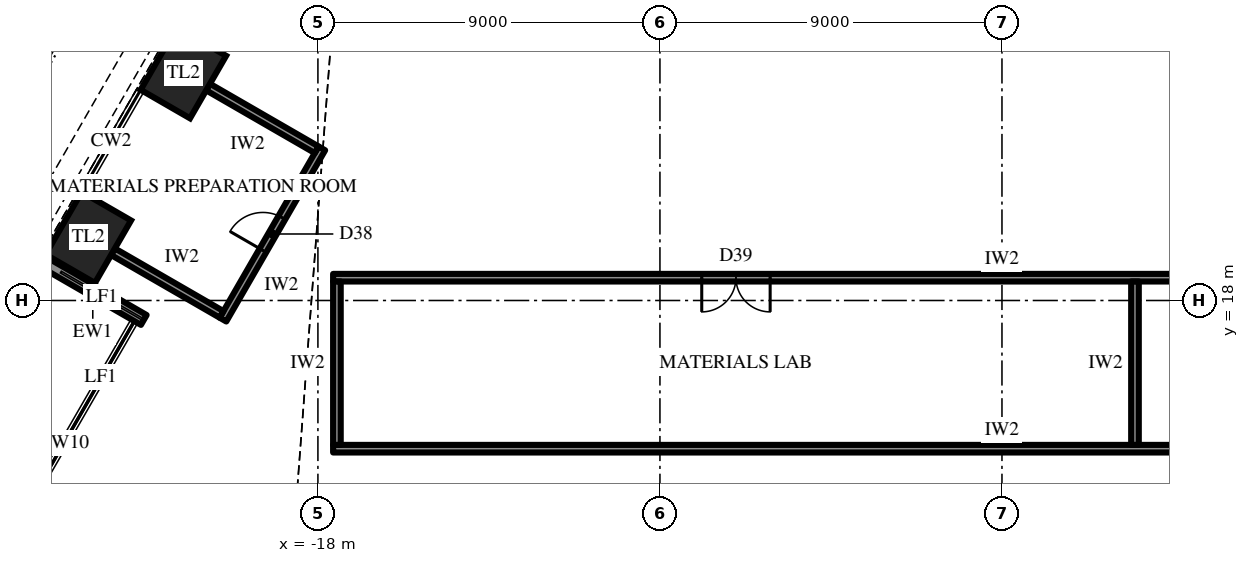
"""IFC4 building model, lengths in metres.
Left out: names, types, materials, properties, quantities, classifications, styles, units other than length and angle.
Written with IfcOpenShell. Run it as: python <this file> out.ifc"""

import sys

from ifc_helpers import new_model, si_unit, direction, frame, frame_2d, origin, origin_2d, place, context, subcontext, project, spatial, rectangle, extrude, element, fill, save


model = new_model("IFC4")
c1 = context("Model", 3, precision=1e-05, world=origin(), true_north=direction((0.0, 1.0)))
c2 = subcontext(c1, "Body", "Model", "MODEL_VIEW")
j1 = project(units=[si_unit("LENGTHUNIT", "METRE"), si_unit("PLANEANGLEUNIT", "RADIAN")], contexts=[c1])
p1 = place(None, origin())
s1 = spatial("IfcSite", under=j1, at=p1, CompositionType="ELEMENT")
p2 = place(p1, origin())
s2 = spatial("IfcBuilding", under=s1, at=p2, CompositionType="ELEMENT")
p3 = place(p2, frame((0.0, 0.0, 199.3)))
s3 = spatial("IfcBuildingStorey", under=s2, at=p3, CompositionType="ELEMENT", Elevation=199.3)
for number, where, z_axis, x_axis in (
    (1, (-21.54, 23.992, 0.0), (0.0, 0.0, 1.0), (-0.5, -0.866, 0.0)),
    (2, (-24.042, 19.658, 0.0), (0.0, 0.0, 1.0), (-0.5, -0.866, 0.0)),
):
    element("IfcColumn", number, at=place(p3, frame(where, z_axis=z_axis, x_axis=x_axis)), inside=s3, PredefinedType="COLUMN", context=c2, shape_type="SweptSolid", body=[
        extrude(rectangle(XDim=1.9, YDim=1.5, at=origin_2d()), origin(), (0.0, 0.0, 1.0), 4.2),
    ])
p4 = place(p3, frame((-25.266, 19.037, 0.0), z_axis=(0.0, 0.0, 1.0), x_axis=(0.86600983753, -0.500026960575, 0.0)))
e3 = element("IfcWall", 3, at=p4, inside=s3, PredefinedType="SOLIDWALL", context=c2, shape_type="SweptSolid", body=[
    extrude(rectangle(XDim=3.1, YDim=0.3, at=frame_2d((1.55, 0.0))), origin(), (0.0, 0.0, 1.0), 2.2),
])
p5 = place(p3, frame((-17.6, 14.1, 0.0), z_axis=(0.0, 0.0, 1.0), x_axis=(1.0, 0.0, 0.0)))
e4 = element("IfcWall", 4, at=p5, inside=s3, PredefinedType="PARTITIONING", context=c2, shape_type="SweptSolid", body=[
    extrude(rectangle(XDim=35.2, YDim=0.2, at=frame_2d((17.6, 0.0))), origin(), (0.0, 0.0, 1.0), 3.9),
])
p6 = place(p3, frame((-17.6, 18.6, 0.0), z_axis=(0.0, 0.0, 1.0), x_axis=(1.0, 0.0, 0.0)))
e5 = element("IfcWall", 5, at=p6, inside=s3, PredefinedType="PARTITIONING", context=c2, shape_type="SweptSolid", body=[
    extrude(rectangle(XDim=35.2, YDim=0.2, at=frame_2d((17.6, 0.0))), origin(), (0.0, 0.0, 1.0), 3.9),
])
p7 = place(p6, frame((9.7, 0.0, 0.0)))
e6 = element("IfcOpeningElement", 6, at=p7, cuts=e5, PredefinedType="OPENING", context=c2, shape_type="SweptSolid", body=[
    extrude(rectangle(XDim=1.8, YDim=2.4, at=frame_2d((0.9, 1.2))), frame((0.0, 0.11, 0.0), z_axis=(0.0, -1.0, 0.0), x_axis=(1.0, 0.0, 0.0)), (0.0, 0.0, 1.0), 0.22),
])
p8 = place(p6, frame((27.2, 0.0, 0.0)))
e7 = element("IfcOpeningElement", 7, at=p8, cuts=e5, PredefinedType="OPENING", context=c2, shape_type="SweptSolid", body=[
    extrude(rectangle(XDim=1.8, YDim=2.4, at=frame_2d((0.9, 1.2))), frame((0.0, 0.11, 0.0), z_axis=(0.0, -1.0, 0.0), x_axis=(1.0, 0.0, 0.0)), (0.0, 0.0, 1.0), 0.22),
])
for number, where, z_axis, x_axis in (
    (8, (-17.5, 14.2, 0.0), (0.0, 0.0, 1.0), (0.0, 1.0, 0.0)),
    (9, (3.5, 14.2, 0.0), (0.0, 0.0, 1.0), (0.0, 1.0, 0.0)),
):
    element("IfcWall", number, at=place(p3, frame(where, z_axis=z_axis, x_axis=x_axis)), inside=s3, PredefinedType="PARTITIONING", context=c2, shape_type="SweptSolid", body=[
        extrude(rectangle(XDim=4.3, YDim=0.2, at=frame_2d((2.15, 0.0))), origin(), (0.0, 0.0, 1.0), 3.9),
    ])
p9 = place(p3, frame((-17.896, 22.003, 0.0), z_axis=(0.0, 0.0, 1.0), x_axis=(-0.500009456303, -0.866019944116, 0.0)))
e10 = element("IfcWall", 10, at=p9, inside=s3, PredefinedType="PARTITIONING", context=c2, shape_type="SweptSolid", body=[
    extrude(rectangle(XDim=5.204, YDim=0.2, at=frame_2d((2.602, 0.0))), origin(), (0.0, 0.0, 1.0), 3.9),
])
p10 = place(p9, frame((2.102, 0.0, 0.0)))
e11 = element("IfcOpeningElement", 11, at=p10, cuts=e10, PredefinedType="OPENING", context=c2, shape_type="SweptSolid", body=[
    extrude(rectangle(XDim=1.0, YDim=2.2, at=frame_2d((0.5, 1.1))), frame((0.0, 0.11, 0.0), z_axis=(0.0, -1.0, 0.0), x_axis=(1.0, 0.0, 0.0)), (0.0, 0.0, 1.0), 0.22),
])
for number, where, z_axis, x_axis in (
    (12, (-18.032, 21.967, 0.0), (0.0, 0.0, 1.0), (-0.866, 0.5, 0.0)),
    (13, (-20.534, 17.633, 0.0), (0.0, 0.0, 1.0), (-0.866, 0.5, 0.0)),
):
    element("IfcWall", number, at=place(p3, frame(where, z_axis=z_axis, x_axis=x_axis)), inside=s3, PredefinedType="PARTITIONING", context=c2, shape_type="SweptSolid", body=[
        extrude(rectangle(XDim=3.3, YDim=0.2, at=frame_2d((1.65, 0.0))), origin(), (0.0, 0.0, 1.0), 2.892),
    ])
p11 = place(p7, frame((1.8, 0.0, 0.0), z_axis=(0.0, 0.0, 1.0), x_axis=(-1.0, 0.0, 0.0)))
e14 = element("IfcDoor", 14, at=p11, inside=s3, OperationType="DOUBLE_DOOR_SINGLE_SWING", PredefinedType="DOOR", context=c2, shape_type="SweptSolid", body=[
    extrude(rectangle(XDim=1.8, YDim=2.4, at=frame_2d((0.9, 1.2))), frame((0.0, 0.025, 0.0), z_axis=(0.0, -1.0, 0.0), x_axis=(1.0, 0.0, 0.0)), (0.0, 0.0, 1.0), 0.05),
])
fill(e6, e14)
p12 = place(p10, frame((1.0, 0.0, 0.0), z_axis=(0.0, 0.0, 1.0), x_axis=(-1.0, 0.0, 0.0)))
e15 = element("IfcDoor", 15, at=p12, inside=s3, OperationType="SINGLE_SWING_RIGHT", PredefinedType="DOOR", context=c2, shape_type="SweptSolid", body=[
    extrude(rectangle(XDim=1.0, YDim=2.2, at=frame_2d((0.5, 1.1))), frame((0.0, 0.025, 0.0), z_axis=(0.0, -1.0, 0.0), x_axis=(1.0, 0.0, 0.0)), (0.0, 0.0, 1.0), 0.05),
])
fill(e11, e15)
save(model, sys.argv[1])
